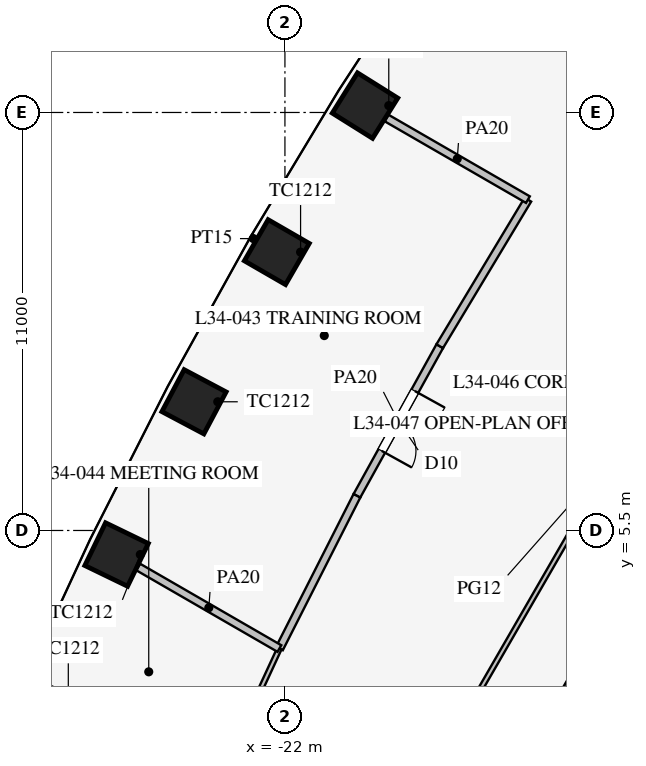
"""IFC4 building model, lengths in metres.
Left out: names, types, materials, properties, quantities, classifications, styles, units other than length and angle.
Written with IfcOpenShell. Run it as: python <this file> out.ifc"""

import sys

from ifc_helpers import new_model, si_unit, direction, frame, frame_2d, origin, origin_2d, place, context, subcontext, project, spatial, rectangle, extrude, element, fill, save


model = new_model("IFC4")
c1 = context("Model", 3, precision=1e-05, world=origin(), true_north=direction((0.0, 1.0)))
c2 = subcontext(c1, "Body", "Model", "MODEL_VIEW")
j1 = project(units=[si_unit("LENGTHUNIT", "METRE"), si_unit("PLANEANGLEUNIT", "RADIAN")], contexts=[c1])
p1 = place(None, origin())
s1 = spatial("IfcSite", under=j1, at=p1, CompositionType="ELEMENT")
p2 = place(p1, origin())
s2 = spatial("IfcBuilding", under=s1, at=p2, CompositionType="ELEMENT")
p3 = place(p2, frame((0.0, 0.0, 149.3)))
s3 = spatial("IfcBuildingStorey", under=s2, at=p3, CompositionType="ELEMENT", Elevation=149.3)
for number, where, z_axis, x_axis in (
    (1, (-19.893, 16.681, 0.0), (0.0, 0.0, 1.0), (-0.531, -0.847, 0.0)),
    (2, (-22.213, 12.825, 0.0), (0.0, 0.0, 1.0), (-0.5, -0.866, 0.0)),
    (3, (-24.393, 8.887, 0.0), (0.0, 0.0, 1.0), (-0.468, -0.883, 0.0)),
    (4, (-26.43, 4.867, 0.0), (0.0, 0.0, 1.0), (-0.436, -0.9, 0.0)),
    (5, (-28.325, 0.765, 0.0), (0.0, 0.0, 1.0), (-0.403, -0.915, 0.0)),
):
    element("IfcColumn", number, at=place(p3, frame(where, z_axis=z_axis, x_axis=x_axis)), inside=s3, PredefinedType="COLUMN", context=c2, shape_type="SweptSolid", body=[
        extrude(rectangle(XDim=1.25, YDim=1.25, at=origin_2d()), origin(), (0.0, 0.0, 1.0), 4.2),
    ])
p4 = place(p3, frame((-5.773, 16.0, 0.0), z_axis=(0.0, 0.0, 1.0), x_axis=(-0.500002442456, -0.866023993627, 0.0)))
e6 = element("IfcWall", 6, at=p4, inside=s3, PredefinedType="SHEAR", context=c2, shape_type="SweptSolid", body=[
    extrude(rectangle(XDim=21.939, YDim=0.8, at=frame_2d((10.97, 0.0))), origin(), (0.0, 0.0, 1.0), 4.2),
])
p5 = place(p4, frame((17.27, 0.0, 0.0)))
e7 = element("IfcOpeningElement", 7, at=p5, cuts=e6, PredefinedType="OPENING", context=c2, shape_type="SweptSolid", body=[
    extrude(rectangle(XDim=1.2, YDim=2.1, at=frame_2d((0.6, 1.05))), frame((0.0, 0.41, 0.0), z_axis=(0.0, -1.0, 0.0), x_axis=(1.0, 0.0, 0.0)), (0.0, 0.0, 1.0), 0.82),
])
p6 = place(p4, frame((3.47, 0.0, 0.0)))
e8 = element("IfcOpeningElement", 8, at=p6, cuts=e6, PredefinedType="OPENING", context=c2, shape_type="SweptSolid", body=[
    extrude(rectangle(XDim=1.2, YDim=2.1, at=frame_2d((0.6, 1.05))), frame((0.0, 0.41, 0.0), z_axis=(0.0, -1.0, 0.0), x_axis=(1.0, 0.0, 0.0)), (0.0, 0.0, 1.0), 0.82),
])
p7 = place(p3, frame((-0.016, 30.491, 0.0), z_axis=(0.0, 0.0, 1.0), x_axis=(-0.50000091641, -0.866024874695, 0.0)))
e9 = element("IfcWall", 9, at=p7, inside=s3, PredefinedType="PARTITIONING", context=c2, shape_type="SweptSolid", body=[
    extrude(rectangle(XDim=52.796, YDim=0.12, at=frame_2d((26.398, 0.0))), origin(), (0.0, 0.0, 1.0), 2.9),
])
p8 = place(p7, frame((10.2, 0.0, 0.15)))
e10 = element("IfcOpeningElement", 10, at=p8, cuts=e9, PredefinedType="OPENING", context=c2, shape_type="SweptSolid", body=[
    extrude(rectangle(XDim=1.8, YDim=2.1, at=frame_2d((0.9, 1.05))), frame((0.0, 0.07, 0.0), z_axis=(0.0, -1.0, 0.0), x_axis=(1.0, 0.0, 0.0)), (0.0, 0.0, 1.0), 0.14),
])
p9 = place(p7, frame((40.8, 0.0, 0.15)))
e11 = element("IfcOpeningElement", 11, at=p9, cuts=e9, PredefinedType="OPENING", context=c2, shape_type="SweptSolid", body=[
    extrude(rectangle(XDim=1.8, YDim=2.1, at=frame_2d((0.9, 1.05))), frame((0.0, 0.07, 0.0), z_axis=(0.0, -1.0, 0.0), x_axis=(1.0, 0.0, 0.0)), (0.0, 0.0, 1.0), 0.14),
])
p10 = place(p3, frame((-22.758, 13.139, 0.0), z_axis=(0.0, 0.0, 1.0), x_axis=(-0.866063163075, 0.499934593286, 0.0)))
e12 = element("IfcWall", 12, at=p10, inside=s3, PredefinedType="PARTITIONING", context=c2, shape_type="SweptSolid", body=[
    extrude(rectangle(XDim=0.166, YDim=0.15, at=frame_2d((0.083, 0.0))), origin(), (0.0, 0.0, 1.0), 2.9),
])
p11 = place(p3, frame((-17.927, 10.35, 0.0), z_axis=(0.0, 0.0, 1.0), x_axis=(-0.484292898211, -0.874905931368, 0.0)))
e13 = element("IfcWall", 13, at=p11, inside=s3, PredefinedType="PARTITIONING", context=c2, shape_type="SweptSolid", body=[
    extrude(rectangle(XDim=4.501, YDim=0.2, at=frame_2d((2.25, 0.0))), origin(), (0.0, 0.0, 1.0), 2.9),
])
p12 = place(p11, frame((1.35, 0.0, 0.15)))
e14 = element("IfcOpeningElement", 14, at=p12, cuts=e13, PredefinedType="OPENING", context=c2, shape_type="SweptSolid", body=[
    extrude(rectangle(XDim=1.8, YDim=2.1, at=frame_2d((0.9, 1.05))), frame((0.0, 0.11, 0.0), z_axis=(0.0, -1.0, 0.0), x_axis=(1.0, 0.0, 0.0)), (0.0, 0.0, 1.0), 0.22),
])
p13 = place(p3, frame((-20.106, 6.412, 0.0), z_axis=(0.0, 0.0, 1.0), x_axis=(-0.452471679136, -0.891778772779, 0.0)))
e15 = element("IfcWall", 15, at=p13, inside=s3, PredefinedType="PARTITIONING", context=c2, shape_type="SweptSolid", body=[
    extrude(rectangle(XDim=4.507, YDim=0.2, at=frame_2d((2.253, 0.0))), origin(), (0.0, 0.0, 1.0), 2.9),
])
p14 = place(p3, frame((-22.145, 2.393, 0.0), z_axis=(0.0, 0.0, 1.0), x_axis=(-0.41992827805, -0.90755729367, 0.0)))
e16 = element("IfcWall", 16, at=p14, inside=s3, PredefinedType="PARTITIONING", context=c2, shape_type="SweptSolid", body=[
    extrude(rectangle(XDim=4.519, YDim=0.12, at=frame_2d((2.259, 0.0))), origin(), (0.0, 0.0, 1.0), 2.9),
])
p15 = place(p14, frame((1.75, 0.0, 0.15)))
e17 = element("IfcOpeningElement", 17, at=p15, cuts=e16, PredefinedType="OPENING", context=c2, shape_type="SweptSolid", body=[
    extrude(rectangle(XDim=1.0, YDim=2.1, at=frame_2d((0.5, 1.05))), frame((0.0, 0.07, 0.0), z_axis=(0.0, -1.0, 0.0), x_axis=(1.0, 0.0, 0.0)), (0.0, 0.0, 1.0), 0.14),
])
p16 = place(p3, frame((-15.606, 14.206, 0.0), z_axis=(0.0, 0.0, 1.0), x_axis=(-0.515548366618, -0.856860479703, 0.0)))
e18 = element("IfcWall", 18, at=p16, inside=s3, PredefinedType="PARTITIONING", context=c2, shape_type="SweptSolid", body=[
    extrude(rectangle(XDim=4.501, YDim=0.2, at=frame_2d((2.25, 0.0))), origin(), (0.0, 0.0, 1.0), 2.9),
])
p17 = place(p3, frame((-22.145, 2.393, 0.0), z_axis=(0.0, 0.0, 1.0), x_axis=(-0.866035893414, 0.499981830989, 0.0)))
e19 = element("IfcWall", 19, at=p17, inside=s3, PredefinedType="PARTITIONING", context=c2, shape_type="SweptSolid", body=[
    extrude(rectangle(XDim=4.291, YDim=0.2, at=frame_2d((2.146, 0.0))), origin(), (0.0, 0.0, 1.0), 2.9),
])
p18 = place(p3, frame((-15.606, 14.206, 0.0), z_axis=(0.0, 0.0, 1.0), x_axis=(-0.866005690956, 0.500034142066, 0.0)))
e20 = element("IfcWall", 20, at=p18, inside=s3, PredefinedType="PARTITIONING", context=c2, shape_type="SweptSolid", body=[
    extrude(rectangle(XDim=4.294, YDim=0.2, at=frame_2d((2.147, 0.0))), origin(), (0.0, 0.0, 1.0), 2.9),
])
p19 = place(p12, origin())
e21 = element("IfcDoor", 21, at=p19, inside=s3, OperationType="DOUBLE_DOOR_SINGLE_SWING", PredefinedType="DOOR", context=c2, shape_type="SweptSolid", body=[
    extrude(rectangle(XDim=1.8, YDim=2.1, at=frame_2d((0.9, 1.05))), frame((0.0, 0.025, 0.0), z_axis=(0.0, -1.0, 0.0), x_axis=(1.0, 0.0, 0.0)), (0.0, 0.0, 1.0), 0.05),
])
fill(e14, e21)
save(model, sys.argv[1])
